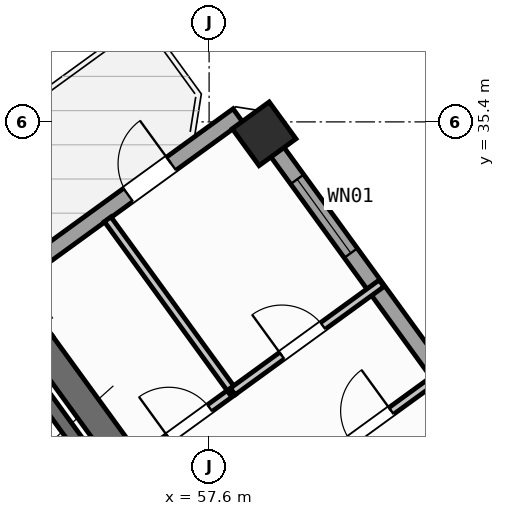
"""IFC4 building model, lengths in metres.
Left out: names, types, materials, properties, quantities, classifications, styles, units other than length and angle.
Written with IfcOpenShell. Run it as: python <this file> out.ifc"""

import sys

from ifc_helpers import new_model, si_unit, direction, frame, frame_2d, origin, origin_2d, place, context, subcontext, project, spatial, rectangle, hollow_rectangle, extrude, source, transform, mapped, element, fill, save


model = new_model("IFC4")
c1 = context("Model", 3, precision=1e-05, world=origin(), true_north=direction((0.0, 1.0)))
c2 = subcontext(c1, "Body", "Model", "MODEL_VIEW")
j1 = project(units=[si_unit("LENGTHUNIT", "METRE"), si_unit("PLANEANGLEUNIT", "RADIAN")], contexts=[c1])
p1 = place(None, origin())
s1 = spatial("IfcSite", under=j1, at=p1, CompositionType="ELEMENT")
p2 = place(p1, origin())
s2 = spatial("IfcBuilding", under=s1, at=p2, CompositionType="ELEMENT")
p3 = place(p2, frame((0.0, 0.0, 151.5)))
s3 = spatial("IfcBuildingStorey", under=s2, at=p3, CompositionType="ELEMENT", Elevation=151.5)
p4 = place(p3, frame((44.365, 24.142, 0.0), z_axis=(0.0, 0.0, 1.0), x_axis=(0.809024304885, 0.587775190107, 0.0)))
e1 = element("IfcWall", 1, at=p4, inside=s3, PredefinedType="SHEAR", context=c2, shape_type="SweptSolid", body=[
    extrude(rectangle(XDim=12.34, YDim=0.55, at=frame_2d((6.17, 0.0))), origin(), (0.0, 0.0, 1.0), 3.35),
])
p5 = place(p3, frame((58.064, 25.813, 0.0), z_axis=(0.0, 0.0, 1.0), x_axis=(-0.587764933797, 0.809031756236, 0.0)))
e2 = element("IfcWall", 2, at=p5, inside=s3, PredefinedType="SHEAR", context=c2, shape_type="SweptSolid", body=[
    extrude(rectangle(XDim=6.425, YDim=0.55, at=frame_2d((3.212, 0.0))), origin(), (0.0, 0.0, 1.0), 3.35),
])
m1 = source(origin(), c2, "Body", "SweptSolid", [
    extrude(hollow_rectangle(XDim=0.9, YDim=0.9, WallThickness=0.036, at=origin_2d()), origin(), (0.0, 0.0, 1.0), 3.6),
])
p6 = place(p3, frame((58.686, 35.165, 0.0), z_axis=(0.0, 0.0, 1.0), x_axis=(0.809016994375, 0.587785252292, 0.0)))
e3 = element("IfcColumn", 3, at=p6, inside=s3, PredefinedType="COLUMN", context=c2, shape_type="MappedRepresentation", body=[
    mapped(m1, transform((0.0, 0.0, 0.0), scale=1.0)),
])
p7 = place(p3, frame((43.938, 25.192, 0.0), z_axis=(0.0, 0.0, 1.0), x_axis=(0.809016324578, 0.587786174187, 0.0)))
e4 = element("IfcWall", 4, at=p7, inside=s3, PredefinedType="STANDARD", context=c2, shape_type="SweptSolid", body=[
    extrude(rectangle(XDim=17.587, YDim=0.32, at=frame_2d((8.794, 0.0))), origin(), (0.0, 0.0, 1.0), 3.35),
])
p8 = place(p7, frame((14.914, 0.0, 0.0)))
e5 = element("IfcOpeningElement", 5, at=p8, cuts=e4, PredefinedType="OPENING", context=c2, shape_type="SweptSolid", body=[
    extrude(rectangle(XDim=1.05, YDim=2.15, at=frame_2d((0.525, 1.075))), frame((0.0, 0.17, 0.0), z_axis=(0.0, -1.0, 0.0), x_axis=(1.0, 0.0, 0.0)), (0.0, 0.0, 1.0), 0.34),
])
p9 = place(p7, frame((2.368, 0.0, 0.8)))
e6 = element("IfcOpeningElement", 6, at=p9, cuts=e4, PredefinedType="OPENING", context=c2, shape_type="SweptSolid", body=[
    extrude(rectangle(XDim=2.1, YDim=1.55, at=frame_2d((1.05, 0.775))), frame((0.0, 0.17, 0.0), z_axis=(0.0, -1.0, 0.0), x_axis=(1.0, 0.0, 0.0)), (0.0, 0.0, 1.0), 0.34),
])
p10 = place(p7, frame((7.419, 0.0, 0.8)))
e7 = element("IfcOpeningElement", 7, at=p10, cuts=e4, PredefinedType="OPENING", context=c2, shape_type="SweptSolid", body=[
    extrude(rectangle(XDim=2.1, YDim=1.55, at=frame_2d((1.05, 0.775))), frame((0.0, 0.17, 0.0), z_axis=(0.0, -1.0, 0.0), x_axis=(1.0, 0.0, 0.0)), (0.0, 0.0, 1.0), 0.34),
])
p11 = place(p3, frame((58.455, 35.484, 0.0), z_axis=(0.0, 0.0, 1.0), x_axis=(0.587783625747, -0.809018176127, 0.0)))
e8 = element("IfcWall", 8, at=p11, inside=s3, PredefinedType="STANDARD", context=c2, shape_type="SweptSolid", body=[
    extrude(rectangle(XDim=21.587, YDim=0.32, at=frame_2d((10.794, 0.0))), origin(), (0.0, 0.0, 1.0), 2.775),
])
p12 = place(p11, frame((1.504, 0.0, 0.85)))
e9 = element("IfcOpeningElement", 9, at=p12, cuts=e8, PredefinedType="OPENING", context=c2, shape_type="SweptSolid", body=[
    extrude(rectangle(XDim=1.8, YDim=1.5, at=frame_2d((0.9, 0.75))), frame((0.0, 0.17, 0.0), z_axis=(0.0, -1.0, 0.0), x_axis=(1.0, 0.0, 0.0)), (0.0, 0.0, 1.0), 0.34),
])
p13 = place(p11, frame((10.444, 0.0, 0.85)))
e10 = element("IfcOpeningElement", 10, at=p13, cuts=e8, PredefinedType="OPENING", context=c2, shape_type="SweptSolid", body=[
    extrude(rectangle(XDim=1.8, YDim=1.5, at=frame_2d((0.9, 0.75))), frame((0.0, 0.17, 0.0), z_axis=(0.0, -1.0, 0.0), x_axis=(1.0, 0.0, 0.0)), (0.0, 0.0, 1.0), 0.34),
])
p14 = place(p11, frame((17.62, 0.0, 0.85)))
e11 = element("IfcOpeningElement", 11, at=p14, cuts=e8, PredefinedType="OPENING", context=c2, shape_type="SweptSolid", body=[
    extrude(rectangle(XDim=1.5, YDim=1.5, at=frame_2d((0.75, 0.75))), frame((0.0, 0.17, 0.0), z_axis=(0.0, -1.0, 0.0), x_axis=(1.0, 0.0, 0.0)), (0.0, 0.0, 1.0), 0.34),
])
p15 = place(p3, frame((55.906, 27.831, 0.0), z_axis=(0.0, 0.0, 1.0), x_axis=(-0.587804123638, 0.809003283204, 0.0)))
e12 = element("IfcWall", 12, at=p15, inside=s3, PredefinedType="SHEAR", context=c2, shape_type="SweptSolid", body=[
    extrude(rectangle(XDim=3.16, YDim=0.26, at=frame_2d((1.58, 0.0))), origin(), (0.0, 0.0, 1.0), 3.35),
])
p16 = place(p3, frame((56.281, 28.782, 0.0), z_axis=(0.0, 0.0, 1.0), x_axis=(0.80902286611, 0.587777170458, 0.0)))
e13 = element("IfcWall", 13, at=p16, inside=s3, PredefinedType="PARTITIONING", context=c2, shape_type="SweptSolid", body=[
    extrude(rectangle(XDim=2.208, YDim=0.16, at=frame_2d((1.104, 0.0))), origin(), (0.0, 0.0, 1.0), 3.34),
])
p17 = place(p16, frame((0.648, 0.0, 0.0)))
e14 = element("IfcOpeningElement", 14, at=p17, cuts=e13, PredefinedType="OPENING", context=c2, shape_type="SweptSolid", body=[
    extrude(rectangle(XDim=1.0, YDim=2.1, at=frame_2d((0.5, 1.05))), frame((0.0, 0.09, 0.0), z_axis=(0.0, -1.0, 0.0), x_axis=(1.0, 0.0, 0.0)), (0.0, 0.0, 1.0), 0.18),
])
p18 = place(p3, frame((58.067, 30.08, 0.0), z_axis=(0.0, 0.0, 1.0), x_axis=(-0.587812175236, 0.808997433027, 0.0)))
e15 = element("IfcWall", 15, at=p18, inside=s3, PredefinedType="PARTITIONING", context=c2, shape_type="SweptSolid", body=[
    extrude(rectangle(XDim=4.2, YDim=0.16, at=frame_2d((2.1, 0.0))), origin(), (0.0, 0.0, 1.0), 3.34),
])
p19 = place(p3, frame((59.331, 28.341, 0.0), z_axis=(0.0, 0.0, 1.0), x_axis=(0.809003564202, 0.587803736896, 0.0)))
e16 = element("IfcWall", 16, at=p19, inside=s3, PredefinedType="PARTITIONING", context=c2, shape_type="SweptSolid", body=[
    extrude(rectangle(XDim=3.63, YDim=0.16, at=frame_2d((1.815, 0.0))), origin(), (0.0, 0.0, 1.0), 3.34),
])
p20 = place(p19, frame((1.305, 0.0, 0.0)))
e17 = element("IfcOpeningElement", 17, at=p20, cuts=e16, PredefinedType="OPENING", context=c2, shape_type="SweptSolid", body=[
    extrude(rectangle(XDim=1.0, YDim=2.1, at=frame_2d((0.5, 1.05))), frame((0.0, 0.09, 0.0), z_axis=(0.0, -1.0, 0.0), x_axis=(1.0, 0.0, 0.0)), (0.0, 0.0, 1.0), 0.18),
])
p21 = place(p3, frame((58.067, 30.08, 0.0), z_axis=(0.0, 0.0, 1.0), x_axis=(0.809012309495, 0.587791700422, 0.0)))
e18 = element("IfcWall", 18, at=p21, inside=s3, PredefinedType="PARTITIONING", context=c2, shape_type="SweptSolid", body=[
    extrude(rectangle(XDim=3.63, YDim=0.16, at=frame_2d((1.815, 0.0))), origin(), (0.0, 0.0, 1.0), 3.34),
])
p22 = place(p21, frame((1.2, 0.0, 0.0)))
e19 = element("IfcOpeningElement", 19, at=p22, cuts=e18, PredefinedType="OPENING", context=c2, shape_type="SweptSolid", body=[
    extrude(rectangle(XDim=1.0, YDim=2.1, at=frame_2d((0.5, 1.05))), frame((0.0, 0.09, 0.0), z_axis=(0.0, -1.0, 0.0), x_axis=(1.0, 0.0, 0.0)), (0.0, 0.0, 1.0), 0.18),
])
m2 = source(origin(), c2, "Body", "SweptSolid", [
    extrude(rectangle(XDim=1.05, YDim=2.15, at=frame_2d((0.525, 1.075))), frame((0.0, 0.025, 0.0), z_axis=(0.0, -1.0, 0.0), x_axis=(1.0, 0.0, 0.0)), (0.0, 0.0, 1.0), 0.05),
])
p23 = place(p8, origin())
e20 = element("IfcDoor", 20, at=p23, inside=s3, OperationType="SINGLE_SWING_RIGHT", PredefinedType="DOOR", context=c2, shape_type="MappedRepresentation", body=[
    mapped(m2, transform((0.0, 0.0, 0.0), scale=1.0)),
])
fill(e5, e20)
m3 = source(origin(), c2, "Body", "SweptSolid", [
    extrude(rectangle(XDim=1.8, YDim=1.5, at=frame_2d((0.9, 0.75))), frame((0.0, 0.03, 0.0), z_axis=(0.0, -1.0, 0.0), x_axis=(1.0, 0.0, 0.0)), (0.0, 0.0, 1.0), 0.06),
])
p24 = place(p12, origin())
e21 = element("IfcWindow", 21, at=p24, inside=s3, PartitioningType="SINGLE_PANEL", PredefinedType="WINDOW", context=c2, shape_type="MappedRepresentation", body=[
    mapped(m3, transform((0.0, 0.0, 0.0), scale=1.0)),
])
fill(e9, e21)
m4 = source(origin(), c2, "Body", "SweptSolid", [
    extrude(rectangle(XDim=1.0, YDim=2.1, at=frame_2d((0.5, 1.05))), frame((0.0, 0.025, 0.0), z_axis=(0.0, -1.0, 0.0), x_axis=(1.0, 0.0, 0.0)), (0.0, 0.0, 1.0), 0.05),
])
p25 = place(p17, origin())
e22 = element("IfcDoor", 22, at=p25, inside=s3, OperationType="SINGLE_SWING_LEFT", PredefinedType="DOOR", context=c2, shape_type="MappedRepresentation", body=[
    mapped(m4, transform((0.0, 0.0, 0.0), scale=1.0)),
])
fill(e14, e22)
p26 = place(p22, origin())
e23 = element("IfcDoor", 23, at=p26, inside=s3, OperationType="SINGLE_SWING_LEFT", PredefinedType="DOOR", context=c2, shape_type="MappedRepresentation", body=[
    mapped(m4, transform((0.0, 0.0, 0.0), scale=1.0)),
])
fill(e19, e23)
p27 = place(p20, origin())
e24 = element("IfcDoor", 24, at=p27, inside=s3, OperationType="SINGLE_SWING_RIGHT", PredefinedType="DOOR", context=c2, shape_type="MappedRepresentation", body=[
    mapped(m4, transform((0.0, 0.0, 0.0), scale=1.0)),
])
fill(e17, e24)
save(model, sys.argv[1])
